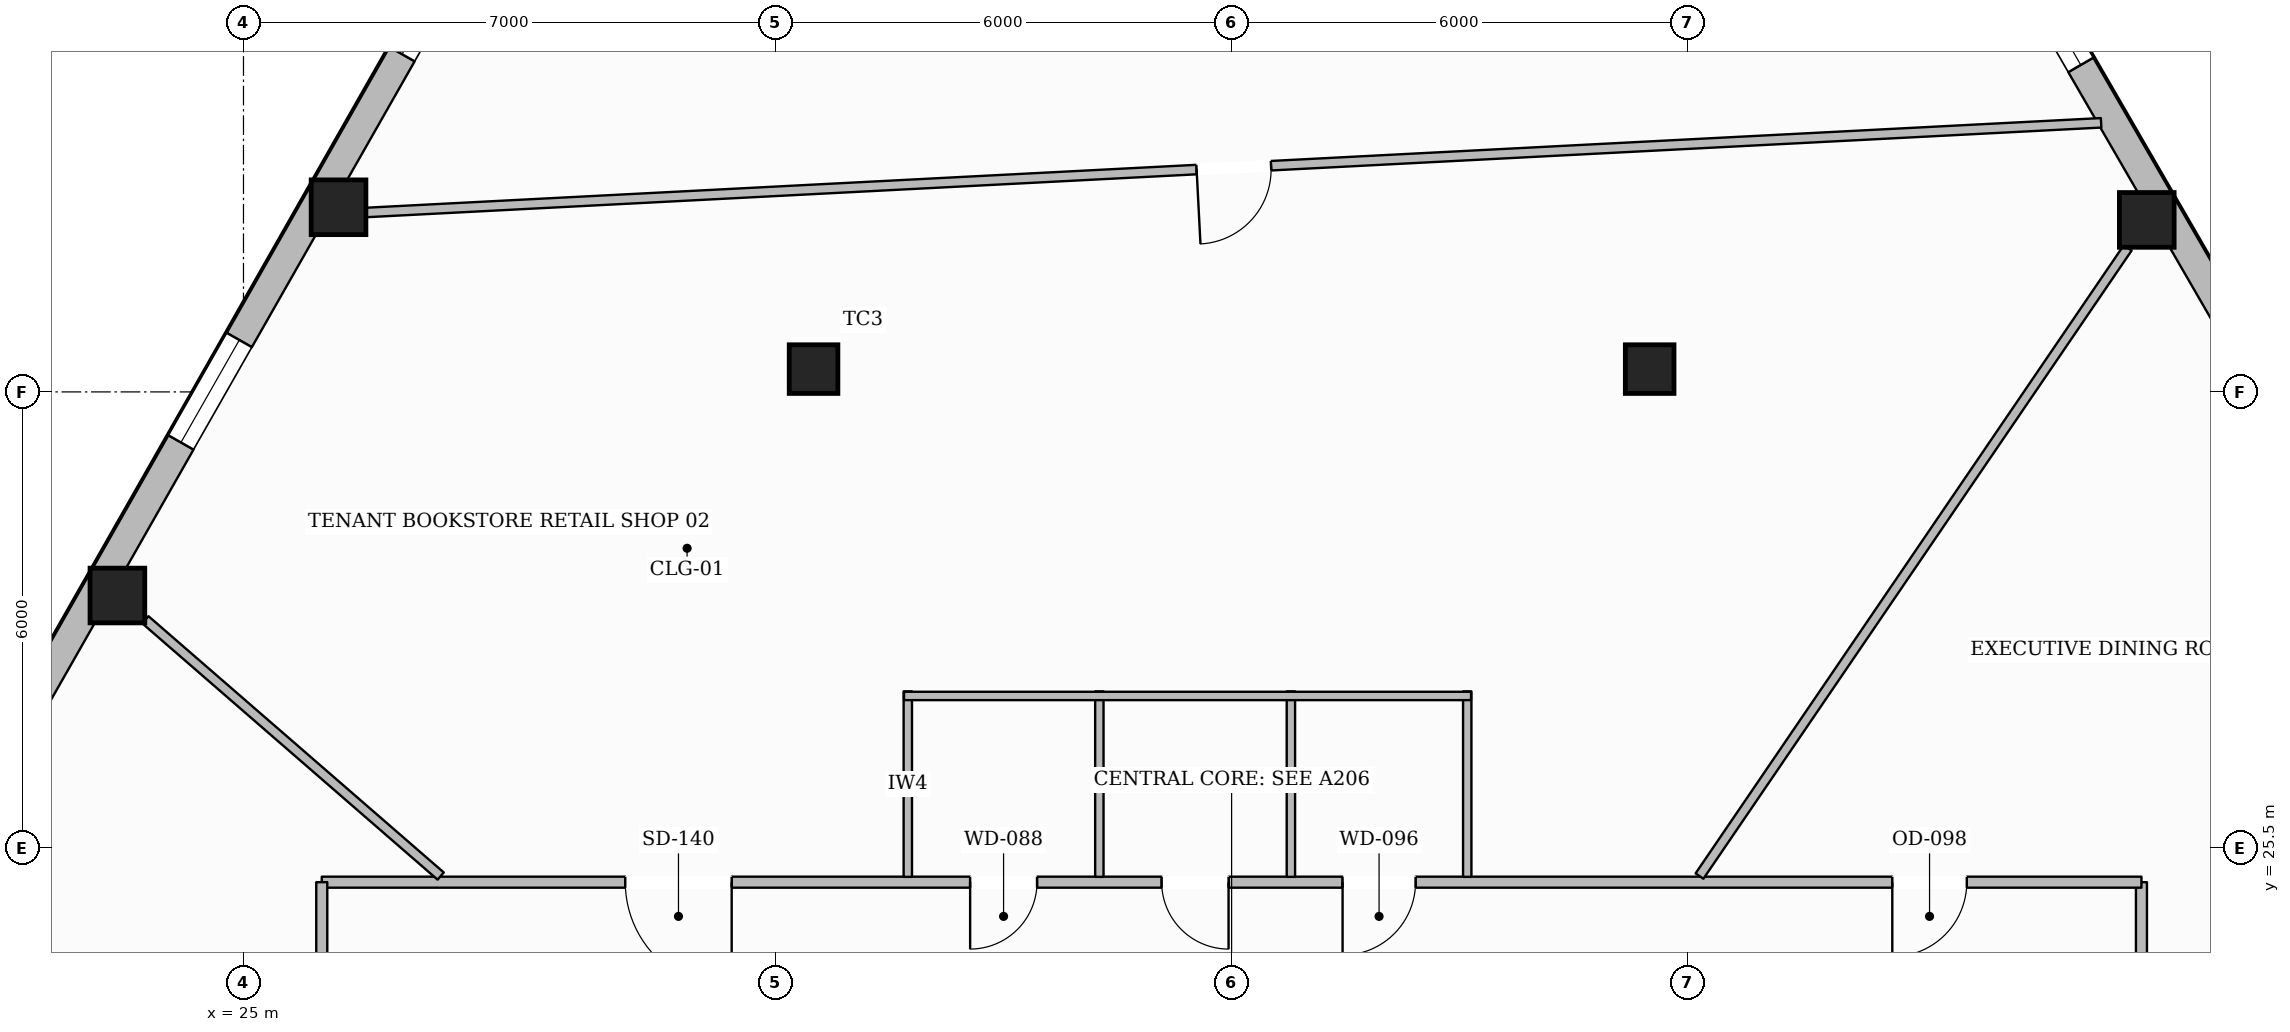
"""IFC4 building model, lengths in metres.
Left out: names, types, materials, properties, quantities, classifications, styles, units other than length and angle.
Written with IfcOpenShell. Run it as: python <this file> out.ifc"""

import sys

from ifc_helpers import new_model, si_unit, direction, frame, frame_2d, origin, origin_2d, place, context, subcontext, project, spatial, rectangle, hollow_rectangle, extrude, element, fill, save


model = new_model("IFC4")
c1 = context("Model", 3, precision=1e-05, world=origin(), true_north=direction((0.0, 1.0)))
c2 = subcontext(c1, "Body", "Model", "MODEL_VIEW")
j1 = project(units=[si_unit("LENGTHUNIT", "METRE"), si_unit("PLANEANGLEUNIT", "RADIAN")], contexts=[c1])
p1 = place(None, origin())
s1 = spatial("IfcSite", under=j1, at=p1, CompositionType="ELEMENT")
p2 = place(p1, origin())
s2 = spatial("IfcBuilding", under=s1, at=p2, CompositionType="ELEMENT")
p3 = place(p2, frame((0.0, 0.0, 112.45)))
s3 = spatial("IfcBuildingStorey", under=s2, at=p3, CompositionType="ELEMENT", Elevation=112.45)
for number, where, z_axis, x_axis in (
    (1, (26.25, 33.929, 0.0), (0.0, 0.0, 1.0), (1.0, 0.0, 0.0)),
    (2, (23.342, 28.821, 0.0), (0.0, 0.0, 1.0), (1.0, 0.0, 0.0)),
    (3, (50.04, 33.763, 0.0), (0.0, 0.0, 1.0), (1.0, 0.0, 0.0)),
):
    element("IfcColumn", number, at=place(p3, frame(where, z_axis=z_axis, x_axis=x_axis)), inside=s3, PredefinedType="COLUMN", context=c2, shape_type="SweptSolid", body=[
        extrude(hollow_rectangle(XDim=0.72, YDim=0.72, WallThickness=0.032, at=origin_2d()), origin(), (0.0, 0.0, 1.0), 3.6),
    ])
for number, where, z_axis, x_axis in (
    (4, (32.5, 31.8, 0.0), (0.0, 0.0, 1.0), (1.0, 0.0, 0.0)),
    (5, (43.5, 31.8, 0.0), (0.0, 0.0, 1.0), (1.0, 0.0, 0.0)),
):
    element("IfcColumn", number, at=place(p3, frame(where, z_axis=z_axis, x_axis=x_axis)), inside=s3, PredefinedType="COLUMN", context=c2, shape_type="SweptSolid", body=[
        extrude(hollow_rectangle(XDim=0.64, YDim=0.64, WallThickness=0.028, at=origin_2d()), origin(), (0.0, 0.0, 1.0), 3.6),
    ])
p4 = place(p3, frame((14.144, 13.219, 0.0), z_axis=(0.0, 0.0, 1.0), x_axis=(0.494900960409, 0.868949388277, 0.0)))
e6 = element("IfcWall", 6, at=p4, inside=s3, PredefinedType="STANDARD", context=c2, shape_type="SweptSolid", body=[
    extrude(rectangle(XDim=36.225, YDim=0.38, at=frame_2d((18.113, 0.0))), origin(), (0.0, 0.0, 1.0), 3.059),
])
p5 = place(p4, frame((32.03, 0.0, 0.65)))
e7 = element("IfcOpeningElement", 7, at=p5, cuts=e6, PredefinedType="OPENING", context=c2, shape_type="SweptSolid", body=[
    extrude(rectangle(XDim=1.55, YDim=1.75, at=frame_2d((0.775, 0.875))), frame((0.0, 0.2, 0.0), z_axis=(0.0, -1.0, 0.0), x_axis=(1.0, 0.0, 0.0)), (0.0, 0.0, 1.0), 0.4),
])
p6 = place(p4, frame((26.152, 0.0, 0.65)))
e8 = element("IfcOpeningElement", 8, at=p6, cuts=e6, PredefinedType="OPENING", context=c2, shape_type="SweptSolid", body=[
    extrude(rectangle(XDim=1.55, YDim=1.75, at=frame_2d((0.775, 0.875))), frame((0.0, 0.2, 0.0), z_axis=(0.0, -1.0, 0.0), x_axis=(1.0, 0.0, 0.0)), (0.0, 0.0, 1.0), 0.4),
])
p7 = place(p4, frame((20.274, 0.0, 0.65)))
e9 = element("IfcOpeningElement", 9, at=p7, cuts=e6, PredefinedType="OPENING", context=c2, shape_type="SweptSolid", body=[
    extrude(rectangle(XDim=1.55, YDim=1.75, at=frame_2d((0.775, 0.875))), frame((0.0, 0.2, 0.0), z_axis=(0.0, -1.0, 0.0), x_axis=(1.0, 0.0, 0.0)), (0.0, 0.0, 1.0), 0.4),
])
p8 = place(p4, frame((8.518, 0.0, 0.65)))
e10 = element("IfcOpeningElement", 10, at=p8, cuts=e6, PredefinedType="OPENING", context=c2, shape_type="SweptSolid", body=[
    extrude(rectangle(XDim=1.55, YDim=1.75, at=frame_2d((0.775, 0.875))), frame((0.0, 0.2, 0.0), z_axis=(0.0, -1.0, 0.0), x_axis=(1.0, 0.0, 0.0)), (0.0, 0.0, 1.0), 0.4),
])
p9 = place(p4, frame((2.64, 0.0, 0.65)))
e11 = element("IfcOpeningElement", 11, at=p9, cuts=e6, PredefinedType="OPENING", context=c2, shape_type="SweptSolid", body=[
    extrude(rectangle(XDim=1.55, YDim=1.75, at=frame_2d((0.775, 0.875))), frame((0.0, 0.2, 0.0), z_axis=(0.0, -1.0, 0.0), x_axis=(1.0, 0.0, 0.0)), (0.0, 0.0, 1.0), 0.4),
])
p10 = place(p3, frame((44.076, 44.609, 0.0), z_axis=(0.0, 0.0, 1.0), x_axis=(0.500826973377, -0.865547423737, 0.0)))
e12 = element("IfcWall", 12, at=p10, inside=s3, PredefinedType="STANDARD", context=c2, shape_type="SweptSolid", body=[
    extrude(rectangle(XDim=36.65, YDim=0.38, at=frame_2d((18.325, 0.0))), origin(), (0.0, 0.0, 1.0), 3.059),
])
p11 = place(p10, frame((26.887, 0.0, 0.0)))
e13 = element("IfcOpeningElement", 13, at=p11, cuts=e12, PredefinedType="OPENING", context=c2, shape_type="SweptSolid", body=[
    extrude(rectangle(XDim=1.0, YDim=2.2, at=frame_2d((0.5, 1.1))), frame((0.0, 0.2, 0.0), z_axis=(0.0, -1.0, 0.0), x_axis=(1.0, 0.0, 0.0)), (0.0, 0.0, 1.0), 0.4),
])
p12 = place(p10, frame((32.424, 0.0, 0.65)))
e14 = element("IfcOpeningElement", 14, at=p12, cuts=e12, PredefinedType="OPENING", context=c2, shape_type="SweptSolid", body=[
    extrude(rectangle(XDim=1.55, YDim=1.75, at=frame_2d((0.775, 0.875))), frame((0.0, 0.2, 0.0), z_axis=(0.0, -1.0, 0.0), x_axis=(1.0, 0.0, 0.0)), (0.0, 0.0, 1.0), 0.4),
])
p13 = place(p10, frame((20.524, 0.0, 0.65)))
e15 = element("IfcOpeningElement", 15, at=p13, cuts=e12, PredefinedType="OPENING", context=c2, shape_type="SweptSolid", body=[
    extrude(rectangle(XDim=1.55, YDim=1.75, at=frame_2d((0.775, 0.875))), frame((0.0, 0.2, 0.0), z_axis=(0.0, -1.0, 0.0), x_axis=(1.0, 0.0, 0.0)), (0.0, 0.0, 1.0), 0.4),
])
p14 = place(p10, frame((8.625, 0.0, 0.65)))
e16 = element("IfcOpeningElement", 16, at=p14, cuts=e12, PredefinedType="OPENING", context=c2, shape_type="SweptSolid", body=[
    extrude(rectangle(XDim=1.55, YDim=1.75, at=frame_2d((0.775, 0.875))), frame((0.0, 0.2, 0.0), z_axis=(0.0, -1.0, 0.0), x_axis=(1.0, 0.0, 0.0)), (0.0, 0.0, 1.0), 0.4),
])
p15 = place(p10, frame((2.675, 0.0, 0.65)))
e17 = element("IfcOpeningElement", 17, at=p15, cuts=e12, PredefinedType="OPENING", context=c2, shape_type="SweptSolid", body=[
    extrude(rectangle(XDim=1.55, YDim=1.75, at=frame_2d((0.775, 0.875))), frame((0.0, 0.2, 0.0), z_axis=(0.0, -1.0, 0.0), x_axis=(1.0, 0.0, 0.0)), (0.0, 0.0, 1.0), 0.4),
])
p16 = place(p3, frame((49.97, 7.15, 0.0), z_axis=(0.0, 0.0, 1.0), x_axis=(0.0, 1.0, 0.0)))
e18 = element("IfcWall", 18, at=p16, inside=s3, PredefinedType="PARTITIONING", context=c2, shape_type="SweptSolid", body=[
    extrude(rectangle(XDim=17.9, YDim=0.145, at=frame_2d((8.95, 0.0))), origin(), (0.0, 0.0, 1.0), 3.288),
])
p17 = place(p16, frame((8.222, 0.0, 0.0)))
e19 = element("IfcOpeningElement", 19, at=p17, cuts=e18, PredefinedType="OPENING", context=c2, shape_type="SweptSolid", body=[
    extrude(rectangle(XDim=1.02, YDim=2.15, at=frame_2d((0.51, 1.075))), frame((0.0, 0.083, 0.0), z_axis=(0.0, -1.0, 0.0), x_axis=(1.0, 0.0, 0.0)), (0.0, 0.0, 1.0), 0.165),
])
p18 = place(p3, frame((49.97, 25.05, 0.0), z_axis=(0.0, 0.0, 1.0), x_axis=(-1.0, 0.0, 0.0)))
e20 = element("IfcWall", 20, at=p18, inside=s3, PredefinedType="PARTITIONING", context=c2, shape_type="SweptSolid", body=[
    extrude(rectangle(XDim=23.94, YDim=0.145, at=frame_2d((11.97, 0.0))), origin(), (0.0, 0.0, 1.0), 3.6),
])
p19 = place(p18, frame((14.53, 0.0, 0.0)))
e21 = element("IfcOpeningElement", 21, at=p19, cuts=e20, PredefinedType="OPENING", context=c2, shape_type="SweptSolid", body=[
    extrude(rectangle(XDim=0.88, YDim=2.1, at=frame_2d((0.44, 1.05))), frame((0.0, 0.083, 0.0), z_axis=(0.0, -1.0, 0.0), x_axis=(1.0, 0.0, 0.0)), (0.0, 0.0, 1.0), 0.165),
])
p20 = place(p18, frame((12.01, 0.0, 0.0)))
e22 = element("IfcOpeningElement", 22, at=p20, cuts=e20, PredefinedType="OPENING", context=c2, shape_type="SweptSolid", body=[
    extrude(rectangle(XDim=0.88, YDim=2.1, at=frame_2d((0.44, 1.05))), frame((0.0, 0.083, 0.0), z_axis=(0.0, -1.0, 0.0), x_axis=(1.0, 0.0, 0.0)), (0.0, 0.0, 1.0), 0.165),
])
p21 = place(p18, frame((9.55, 0.0, 0.0)))
e23 = element("IfcOpeningElement", 23, at=p21, cuts=e20, PredefinedType="OPENING", context=c2, shape_type="SweptSolid", body=[
    extrude(rectangle(XDim=0.96, YDim=2.1, at=frame_2d((0.48, 1.05))), frame((0.0, 0.083, 0.0), z_axis=(0.0, -1.0, 0.0), x_axis=(1.0, 0.0, 0.0)), (0.0, 0.0, 1.0), 0.165),
])
p22 = place(p18, frame((2.298, 0.0, 0.0)))
e24 = element("IfcOpeningElement", 24, at=p22, cuts=e20, PredefinedType="OPENING", context=c2, shape_type="SweptSolid", body=[
    extrude(rectangle(XDim=0.98, YDim=2.15, at=frame_2d((0.49, 1.075))), frame((0.0, 0.083, 0.0), z_axis=(0.0, -1.0, 0.0), x_axis=(1.0, 0.0, 0.0)), (0.0, 0.0, 1.0), 0.165),
])
p23 = place(p18, frame((18.547, 0.0, 0.0)))
e25 = element("IfcOpeningElement", 25, at=p23, cuts=e20, PredefinedType="OPENING", context=c2, shape_type="SweptSolid", body=[
    extrude(rectangle(XDim=1.4, YDim=2.2, at=frame_2d((0.7, 1.1))), frame((0.0, 0.083, 0.0), z_axis=(0.0, -1.0, 0.0), x_axis=(1.0, 0.0, 0.0)), (0.0, 0.0, 1.0), 0.165),
])
p24 = place(p3, frame((26.03, 25.05, 0.0), z_axis=(0.0, 0.0, 1.0), x_axis=(0.0, -1.0, 0.0)))
e26 = element("IfcWall", 26, at=p24, inside=s3, PredefinedType="PARTITIONING", context=c2, shape_type="SweptSolid", body=[
    extrude(rectangle(XDim=17.9, YDim=0.145, at=frame_2d((8.95, 0.0))), origin(), (0.0, 0.0, 1.0), 3.288),
])
p25 = place(p24, frame((3.333, 0.0, 0.0)))
e27 = element("IfcOpeningElement", 27, at=p25, cuts=e26, PredefinedType="OPENING", context=c2, shape_type="SweptSolid", body=[
    extrude(rectangle(XDim=0.98, YDim=2.15, at=frame_2d((0.49, 1.075))), frame((0.0, 0.083, 0.0), z_axis=(0.0, -1.0, 0.0), x_axis=(1.0, 0.0, 0.0)), (0.0, 0.0, 1.0), 0.165),
])
p26 = place(p24, frame((11.902, 0.0, 0.0)))
e28 = element("IfcOpeningElement", 28, at=p26, cuts=e26, PredefinedType="OPENING", context=c2, shape_type="SweptSolid", body=[
    extrude(rectangle(XDim=1.4, YDim=2.2, at=frame_2d((0.7, 1.1))), frame((0.0, 0.083, 0.0), z_axis=(0.0, -1.0, 0.0), x_axis=(1.0, 0.0, 0.0)), (0.0, 0.0, 1.0), 0.165),
])
for number, where, z_axis, x_axis in (
    (29, (33.74, 25.12, 0.0), (0.0, 0.0, 1.0), (0.0, 1.0, 0.0)),
    (30, (36.26, 25.12, 0.0), (0.0, 0.0, 1.0), (0.0, 1.0, 0.0)),
    (31, (38.78, 25.12, 0.0), (0.0, 0.0, 1.0), (0.0, 1.0, 0.0)),
    (32, (41.1, 25.12, 0.0), (0.0, 0.0, 1.0), (0.0, 1.0, 0.0)),
):
    element("IfcWall", number, at=place(p3, frame(where, z_axis=z_axis, x_axis=x_axis)), inside=s3, PredefinedType="PLUMBINGWALL", context=c2, shape_type="SweptSolid", body=[
        extrude(rectangle(XDim=2.44, YDim=0.11, at=frame_2d((1.22, 0.0))), origin(), (0.0, 0.0, 1.0), 3.6),
    ])
p27 = place(p3, frame((33.69, 27.5, 0.0), z_axis=(0.0, 0.0, 1.0), x_axis=(1.0, 0.0, 0.0)))
e33 = element("IfcWall", 33, at=p27, inside=s3, PredefinedType="PLUMBINGWALL", context=c2, shape_type="SweptSolid", body=[
    extrude(rectangle(XDim=7.46, YDim=0.11, at=frame_2d((3.73, 0.0))), origin(), (0.0, 0.0, 1.0), 3.6),
])
p28 = place(p3, frame((44.156, 25.131, 0.0), z_axis=(0.0, 0.0, 1.0), x_axis=(0.563244412967, 0.826290343197, 0.0)))
e34 = element("IfcWall", 34, at=p28, inside=s3, PredefinedType="PARTITIONING", context=c2, shape_type="SweptSolid", body=[
    extrude(rectangle(XDim=10.001, YDim=0.125, at=frame_2d((5.001, 0.0))), origin(), (0.0, 0.0, 1.0), 3.6),
])
p29 = place(p3, frame((27.594, 25.131, 0.0), z_axis=(0.0, 0.0, 1.0), x_axis=(-0.75527236731, 0.655411055124, 0.0)))
e35 = element("IfcWall", 35, at=p29, inside=s3, PredefinedType="PARTITIONING", context=c2, shape_type="SweptSolid", body=[
    extrude(rectangle(XDim=5.144, YDim=0.125, at=frame_2d((2.572, 0.0))), origin(), (0.0, 0.0, 1.0), 3.141),
])
p30 = place(p3, frame((49.439, 35.04, 0.0), z_axis=(0.0, 0.0, 1.0), x_axis=(-0.998667112639, -0.051613933513, 0.0)))
e36 = element("IfcWall", 36, at=p30, inside=s3, PredefinedType="PARTITIONING", context=c2, shape_type="SweptSolid", body=[
    extrude(rectangle(XDim=22.851, YDim=0.125, at=frame_2d((11.426, 0.0))), origin(), (0.0, 0.0, 1.0), 3.6),
])
p31 = place(p30, frame((10.936, 0.0, 0.0)))
e37 = element("IfcOpeningElement", 37, at=p31, cuts=e36, PredefinedType="OPENING", context=c2, shape_type="SweptSolid", body=[
    extrude(rectangle(XDim=0.98, YDim=2.15, at=frame_2d((0.49, 1.075))), frame((0.0, 0.073, 0.0), z_axis=(0.0, -1.0, 0.0), x_axis=(1.0, 0.0, 0.0)), (0.0, 0.0, 1.0), 0.145),
])
p32 = place(p6, origin())
e38 = element("IfcWindow", 38, at=p32, inside=s3, PartitioningType="SINGLE_PANEL", PredefinedType="WINDOW", context=c2, shape_type="SweptSolid", body=[
    extrude(rectangle(XDim=1.55, YDim=1.75, at=frame_2d((0.775, 0.875))), frame((0.0, 0.03, 0.0), z_axis=(0.0, -1.0, 0.0), x_axis=(1.0, 0.0, 0.0)), (0.0, 0.0, 1.0), 0.06),
])
fill(e8, e38)
p33 = place(p7, origin())
e39 = element("IfcWindow", 39, at=p33, inside=s3, PartitioningType="SINGLE_PANEL", PredefinedType="WINDOW", context=c2, shape_type="SweptSolid", body=[
    extrude(rectangle(XDim=1.55, YDim=1.75, at=frame_2d((0.775, 0.875))), frame((0.0, 0.03, 0.0), z_axis=(0.0, -1.0, 0.0), x_axis=(1.0, 0.0, 0.0)), (0.0, 0.0, 1.0), 0.06),
])
fill(e9, e39)
p34 = place(p14, origin())
e40 = element("IfcWindow", 40, at=p34, inside=s3, PartitioningType="SINGLE_PANEL", PredefinedType="WINDOW", context=c2, shape_type="SweptSolid", body=[
    extrude(rectangle(XDim=1.55, YDim=1.75, at=frame_2d((0.775, 0.875))), frame((0.0, 0.03, 0.0), z_axis=(0.0, -1.0, 0.0), x_axis=(1.0, 0.0, 0.0)), (0.0, 0.0, 1.0), 0.06),
])
fill(e16, e40)
p35 = place(p19, origin())
e41 = element("IfcDoor", 41, at=p35, inside=s3, OperationType="SINGLE_SWING_RIGHT", PredefinedType="DOOR", context=c2, shape_type="SweptSolid", body=[
    extrude(rectangle(XDim=0.88, YDim=2.1, at=frame_2d((0.44, 1.05))), frame((0.0, 0.025, 0.0), z_axis=(0.0, -1.0, 0.0), x_axis=(1.0, 0.0, 0.0)), (0.0, 0.0, 1.0), 0.05),
])
fill(e21, e41)
p36 = place(p20, origin())
e42 = element("IfcDoor", 42, at=p36, inside=s3, OperationType="SINGLE_SWING_LEFT", PredefinedType="DOOR", context=c2, shape_type="SweptSolid", body=[
    extrude(rectangle(XDim=0.88, YDim=2.1, at=frame_2d((0.44, 1.05))), frame((0.0, 0.025, 0.0), z_axis=(0.0, -1.0, 0.0), x_axis=(1.0, 0.0, 0.0)), (0.0, 0.0, 1.0), 0.05),
])
fill(e22, e42)
p37 = place(p21, origin())
e43 = element("IfcDoor", 43, at=p37, inside=s3, OperationType="SINGLE_SWING_RIGHT", PredefinedType="DOOR", context=c2, shape_type="SweptSolid", body=[
    extrude(rectangle(XDim=0.96, YDim=2.1, at=frame_2d((0.48, 1.05))), frame((0.0, 0.025, 0.0), z_axis=(0.0, -1.0, 0.0), x_axis=(1.0, 0.0, 0.0)), (0.0, 0.0, 1.0), 0.05),
])
fill(e23, e43)
p38 = place(p22, origin())
e44 = element("IfcDoor", 44, at=p38, inside=s3, OperationType="SINGLE_SWING_RIGHT", PredefinedType="DOOR", context=c2, shape_type="SweptSolid", body=[
    extrude(rectangle(XDim=0.98, YDim=2.15, at=frame_2d((0.49, 1.075))), frame((0.0, 0.025, 0.0), z_axis=(0.0, -1.0, 0.0), x_axis=(1.0, 0.0, 0.0)), (0.0, 0.0, 1.0), 0.05),
])
fill(e24, e44)
p39 = place(p23, origin())
e45 = element("IfcDoor", 45, at=p39, inside=s3, OperationType="SINGLE_SWING_LEFT", PredefinedType="DOOR", context=c2, shape_type="SweptSolid", body=[
    extrude(rectangle(XDim=1.4, YDim=2.2, at=frame_2d((0.7, 1.1))), frame((0.0, 0.025, 0.0), z_axis=(0.0, -1.0, 0.0), x_axis=(1.0, 0.0, 0.0)), (0.0, 0.0, 1.0), 0.05),
])
fill(e25, e45)
p40 = place(p31, origin())
e46 = element("IfcDoor", 46, at=p40, inside=s3, OperationType="SINGLE_SWING_RIGHT", PredefinedType="DOOR", context=c2, shape_type="SweptSolid", body=[
    extrude(rectangle(XDim=0.98, YDim=2.15, at=frame_2d((0.49, 1.075))), frame((0.0, 0.025, 0.0), z_axis=(0.0, -1.0, 0.0), x_axis=(1.0, 0.0, 0.0)), (0.0, 0.0, 1.0), 0.05),
])
fill(e37, e46)
save(model, sys.argv[1])
